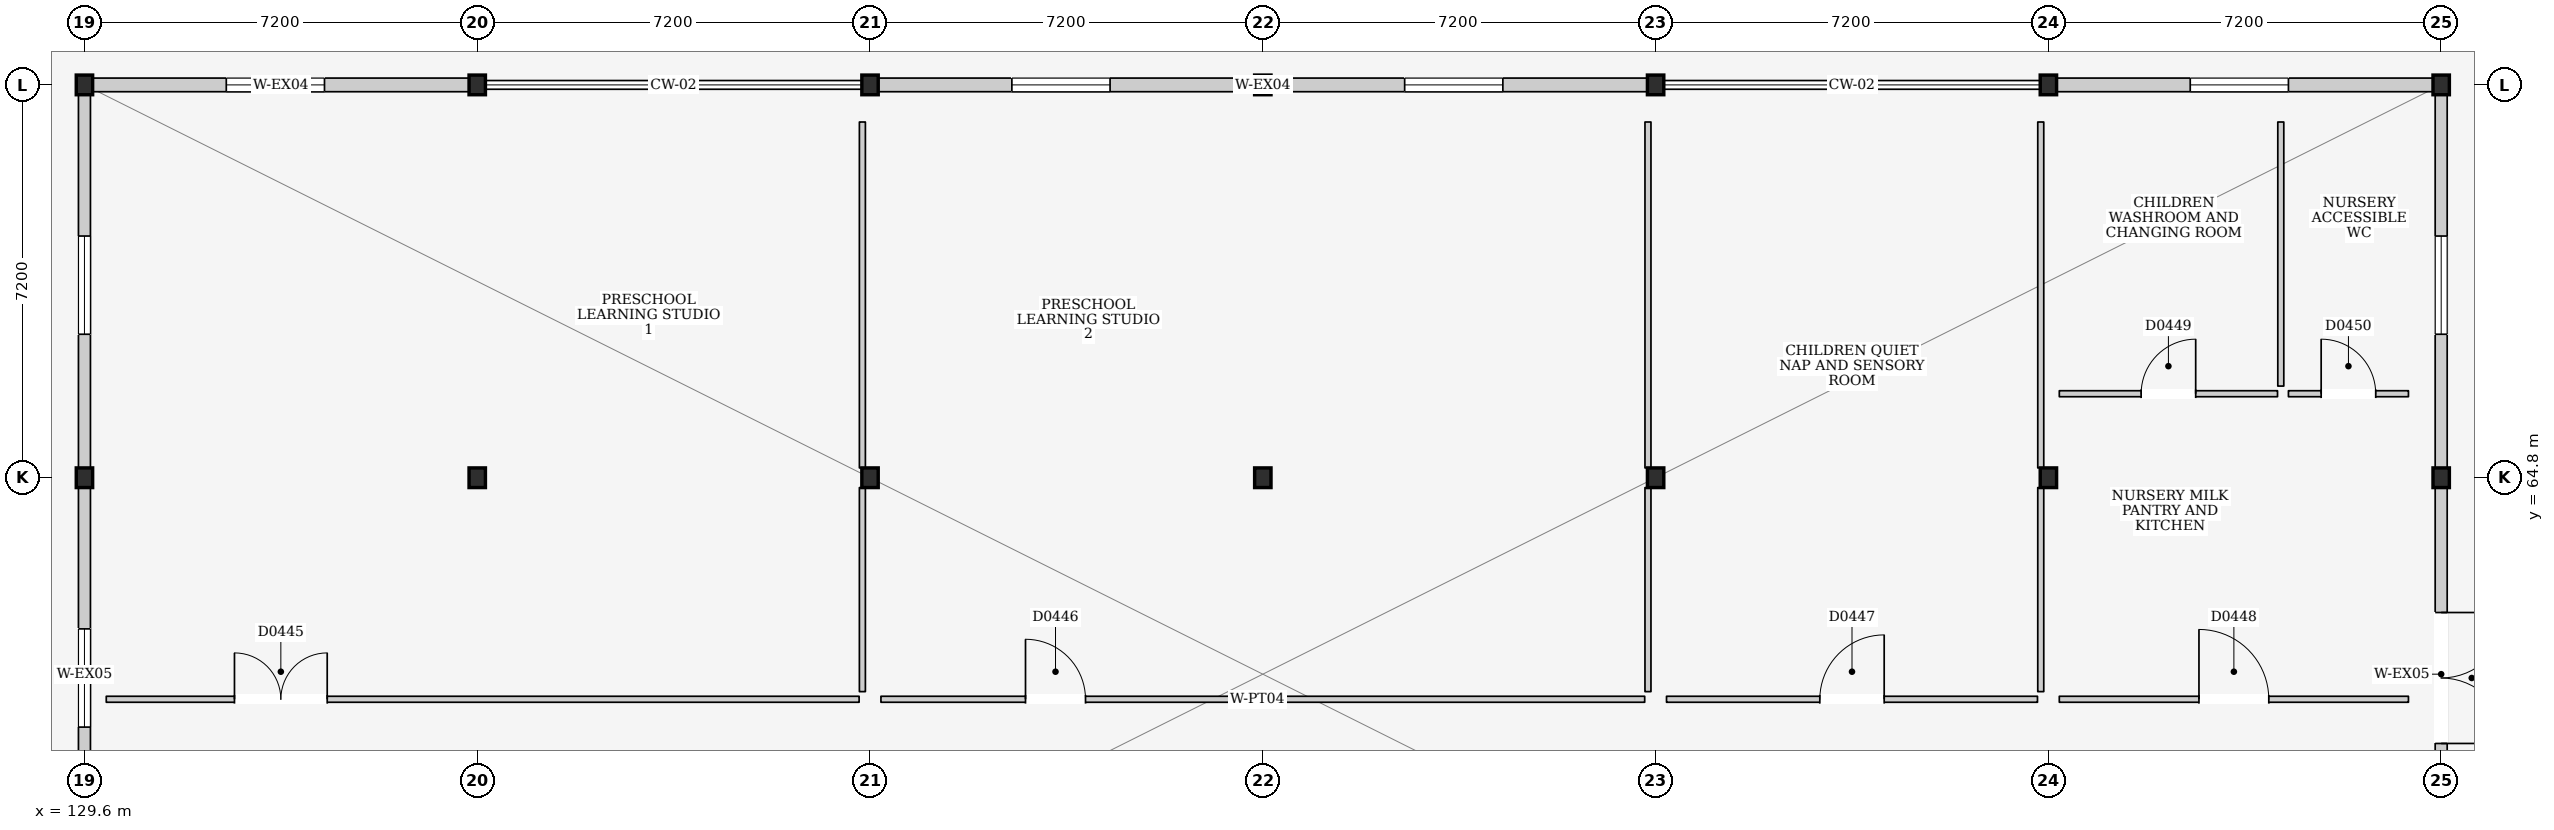
"""IFC4 building model, lengths in metres.
Left out: names, types, materials, properties, quantities, classifications, styles, units other than length and angle.
Written with IfcOpenShell. Run it as: python <this file> out.ifc"""

import sys

from ifc_helpers import new_model, si_unit, direction, frame, frame_2d, origin, origin_2d, place, context, subcontext, project, spatial, rectangle, i_section, extrude, element, fill, save


model = new_model("IFC4")
c1 = context("Model", 3, precision=1e-05, world=origin(), true_north=direction((0.0, 1.0)))
c2 = subcontext(c1, "Body", "Model", "MODEL_VIEW")
j1 = project(units=[si_unit("LENGTHUNIT", "METRE"), si_unit("PLANEANGLEUNIT", "RADIAN")], contexts=[c1])
p1 = place(None, origin())
s1 = spatial("IfcSite", under=j1, at=p1, CompositionType="ELEMENT")
p2 = place(p1, origin())
s2 = spatial("IfcBuilding", under=s1, at=p2, CompositionType="ELEMENT")
p3 = place(p2, origin())
s3 = spatial("IfcBuildingStorey", under=s2, at=p3, CompositionType="ELEMENT", Elevation=0.0)
for number, where, z_axis, x_axis in (
    (1, (129.6, 64.8, 0.0), (0.0, 0.0, 1.0), (1.0, 0.0, 0.0)),
    (2, (129.6, 72.0, 0.0), (0.0, 0.0, 1.0), (1.0, 0.0, 0.0)),
    (3, (136.8, 64.8, 0.0), (0.0, 0.0, 1.0), (1.0, 0.0, 0.0)),
    (4, (136.8, 72.0, 0.0), (0.0, 0.0, 1.0), (1.0, 0.0, 0.0)),
    (5, (144.0, 64.8, 0.0), (0.0, 0.0, 1.0), (1.0, 0.0, 0.0)),
    (6, (144.0, 72.0, 0.0), (0.0, 0.0, 1.0), (1.0, 0.0, 0.0)),
    (7, (151.2, 64.8, 0.0), (0.0, 0.0, 1.0), (1.0, 0.0, 0.0)),
    (8, (151.2, 72.0, 0.0), (0.0, 0.0, 1.0), (1.0, 0.0, 0.0)),
    (9, (158.4, 64.8, 0.0), (0.0, 0.0, 1.0), (1.0, 0.0, 0.0)),
    (10, (158.4, 72.0, 0.0), (0.0, 0.0, 1.0), (1.0, 0.0, 0.0)),
    (11, (165.6, 64.8, 0.0), (0.0, 0.0, 1.0), (1.0, 0.0, 0.0)),
    (12, (165.6, 72.0, 0.0), (0.0, 0.0, 1.0), (1.0, 0.0, 0.0)),
    (13, (172.8, 64.8, 0.0), (0.0, 0.0, 1.0), (1.0, 0.0, 0.0)),
    (14, (172.8, 72.0, 0.0), (0.0, 0.0, 1.0), (1.0, 0.0, 0.0)),
):
    element("IfcColumn", number, at=place(p3, frame(where, z_axis=z_axis, x_axis=x_axis)), inside=s3, PredefinedType="COLUMN", context=c2, shape_type="SweptSolid", body=[
        extrude(i_section(OverallWidth=0.3, OverallDepth=0.36, WebThickness=0.012, FlangeThickness=0.022, at=origin_2d()), origin(), (0.0, 0.0, 1.0), 4.5),
    ])
p4 = place(p3, frame((129.75, 72.0, 0.0), z_axis=(0.0, 0.0, 1.0), x_axis=(1.0, 0.0, 0.0)))
e15 = element("IfcWall", 15, at=p4, inside=s3, PredefinedType="SOLIDWALL", context=c2, shape_type="SweptSolid", body=[
    extrude(rectangle(XDim=6.9, YDim=0.25, at=frame_2d((3.45, 0.0))), origin(), (0.0, 0.0, 1.0), 3.55),
])
p5 = place(p4, frame((2.45, 0.0, 0.85)))
e16 = element("IfcOpeningElement", 16, at=p5, cuts=e15, PredefinedType="OPENING", context=c2, shape_type="SweptSolid", body=[
    extrude(rectangle(XDim=1.8, YDim=1.8, at=frame_2d((0.9, 0.9))), frame((0.0, 0.14, 0.0), z_axis=(0.0, -1.0, 0.0), x_axis=(1.0, 0.0, 0.0)), (0.0, 0.0, 1.0), 0.28),
])
p6 = place(p3, frame((144.15, 72.0, 0.0), z_axis=(0.0, 0.0, 1.0), x_axis=(1.0, 0.0, 0.0)))
e17 = element("IfcWall", 17, at=p6, inside=s3, PredefinedType="SOLIDWALL", context=c2, shape_type="SweptSolid", body=[
    extrude(rectangle(XDim=6.9, YDim=0.25, at=frame_2d((3.45, 0.0))), origin(), (0.0, 0.0, 1.0), 3.55),
])
p7 = place(p6, frame((2.45, 0.0, 0.85)))
e18 = element("IfcOpeningElement", 18, at=p7, cuts=e17, PredefinedType="OPENING", context=c2, shape_type="SweptSolid", body=[
    extrude(rectangle(XDim=1.8, YDim=1.8, at=frame_2d((0.9, 0.9))), frame((0.0, 0.14, 0.0), z_axis=(0.0, -1.0, 0.0), x_axis=(1.0, 0.0, 0.0)), (0.0, 0.0, 1.0), 0.28),
])
p8 = place(p3, frame((151.35, 72.0, 0.0), z_axis=(0.0, 0.0, 1.0), x_axis=(1.0, 0.0, 0.0)))
e19 = element("IfcWall", 19, at=p8, inside=s3, PredefinedType="SOLIDWALL", context=c2, shape_type="SweptSolid", body=[
    extrude(rectangle(XDim=6.9, YDim=0.25, at=frame_2d((3.45, 0.0))), origin(), (0.0, 0.0, 1.0), 3.55),
])
p9 = place(p8, frame((2.45, 0.0, 0.85)))
e20 = element("IfcOpeningElement", 20, at=p9, cuts=e19, PredefinedType="OPENING", context=c2, shape_type="SweptSolid", body=[
    extrude(rectangle(XDim=1.8, YDim=1.8, at=frame_2d((0.9, 0.9))), frame((0.0, 0.14, 0.0), z_axis=(0.0, -1.0, 0.0), x_axis=(1.0, 0.0, 0.0)), (0.0, 0.0, 1.0), 0.28),
])
p10 = place(p3, frame((165.75, 72.0, 0.0), z_axis=(0.0, 0.0, 1.0), x_axis=(1.0, 0.0, 0.0)))
e21 = element("IfcWall", 21, at=p10, inside=s3, PredefinedType="SOLIDWALL", context=c2, shape_type="SweptSolid", body=[
    extrude(rectangle(XDim=6.9, YDim=0.25, at=frame_2d((3.45, 0.0))), origin(), (0.0, 0.0, 1.0), 3.55),
])
p11 = place(p10, frame((2.45, 0.0, 0.85)))
e22 = element("IfcOpeningElement", 22, at=p11, cuts=e21, PredefinedType="OPENING", context=c2, shape_type="SweptSolid", body=[
    extrude(rectangle(XDim=1.8, YDim=1.8, at=frame_2d((0.9, 0.9))), frame((0.0, 0.14, 0.0), z_axis=(0.0, -1.0, 0.0), x_axis=(1.0, 0.0, 0.0)), (0.0, 0.0, 1.0), 0.28),
])
p12 = place(p3, frame((129.6, 57.78, 0.0), z_axis=(0.0, 0.0, 1.0), x_axis=(0.0, 1.0, 0.0)))
e23 = element("IfcWall", 23, at=p12, inside=s3, PredefinedType="ELEMENTEDWALL", context=c2, shape_type="SweptSolid", body=[
    extrude(rectangle(XDim=6.84, YDim=0.22, at=frame_2d((3.42, 0.0))), origin(), (0.0, 0.0, 1.0), 3.585),
])
p13 = place(p12, frame((2.45, 0.0, 0.9)))
e24 = element("IfcOpeningElement", 24, at=p13, cuts=e23, PredefinedType="OPENING", context=c2, shape_type="SweptSolid", body=[
    extrude(rectangle(XDim=1.8, YDim=1.8, at=frame_2d((0.9, 0.9))), frame((0.0, 0.125, 0.0), z_axis=(0.0, -1.0, 0.0), x_axis=(1.0, 0.0, 0.0)), (0.0, 0.0, 1.0), 0.25),
])
p14 = place(p3, frame((172.8, 57.78, 0.0), z_axis=(0.0, 0.0, 1.0), x_axis=(0.0, 1.0, 0.0)))
e25 = element("IfcWall", 25, at=p14, inside=s3, PredefinedType="ELEMENTEDWALL", context=c2, shape_type="SweptSolid", body=[
    extrude(rectangle(XDim=6.84, YDim=0.22, at=frame_2d((3.42, 0.0))), origin(), (0.0, 0.0, 1.0), 3.585),
])
p15 = place(p14, frame((2.15, 0.0, 0.0)))
e26 = element("IfcOpeningElement", 26, at=p15, cuts=e25, PredefinedType="OPENING", context=c2, shape_type="SweptSolid", body=[
    extrude(rectangle(XDim=2.4, YDim=2.4, at=frame_2d((1.2, 1.2))), frame((0.0, 0.125, 0.0), z_axis=(0.0, -1.0, 0.0), x_axis=(1.0, 0.0, 0.0)), (0.0, 0.0, 1.0), 0.25),
])
p16 = place(p3, frame((129.6, 64.98, 0.0), z_axis=(0.0, 0.0, 1.0), x_axis=(0.0, 1.0, 0.0)))
e27 = element("IfcWall", 27, at=p16, inside=s3, PredefinedType="ELEMENTEDWALL", context=c2, shape_type="SweptSolid", body=[
    extrude(rectangle(XDim=6.84, YDim=0.22, at=frame_2d((3.42, 0.0))), origin(), (0.0, 0.0, 1.0), 3.585),
])
p17 = place(p16, frame((2.45, 0.0, 0.9)))
e28 = element("IfcOpeningElement", 28, at=p17, cuts=e27, PredefinedType="OPENING", context=c2, shape_type="SweptSolid", body=[
    extrude(rectangle(XDim=1.8, YDim=1.8, at=frame_2d((0.9, 0.9))), frame((0.0, 0.125, 0.0), z_axis=(0.0, -1.0, 0.0), x_axis=(1.0, 0.0, 0.0)), (0.0, 0.0, 1.0), 0.25),
])
p18 = place(p3, frame((172.8, 64.98, 0.0), z_axis=(0.0, 0.0, 1.0), x_axis=(0.0, 1.0, 0.0)))
e29 = element("IfcWall", 29, at=p18, inside=s3, PredefinedType="ELEMENTEDWALL", context=c2, shape_type="SweptSolid", body=[
    extrude(rectangle(XDim=6.84, YDim=0.22, at=frame_2d((3.42, 0.0))), origin(), (0.0, 0.0, 1.0), 3.585),
])
p19 = place(p18, frame((2.45, 0.0, 0.9)))
e30 = element("IfcOpeningElement", 30, at=p19, cuts=e29, PredefinedType="OPENING", context=c2, shape_type="SweptSolid", body=[
    extrude(rectangle(XDim=1.8, YDim=1.8, at=frame_2d((0.9, 0.9))), frame((0.0, 0.125, 0.0), z_axis=(0.0, -1.0, 0.0), x_axis=(1.0, 0.0, 0.0)), (0.0, 0.0, 1.0), 0.25),
])
p20 = place(p3, frame((130.0, 60.74, 0.0), z_axis=(0.0, 0.0, 1.0), x_axis=(1.0, 0.0, 0.0)))
e31 = element("IfcWall", 31, at=p20, inside=s3, PredefinedType="PARTITIONING", context=c2, shape_type="SweptSolid", body=[
    extrude(rectangle(XDim=13.8, YDim=0.11, at=frame_2d((6.9, 0.0))), origin(), (0.0, 0.0, 1.0), 4.2),
])
p21 = place(p20, frame((2.35, 0.0, 0.0)))
e32 = element("IfcOpeningElement", 32, at=p21, cuts=e31, PredefinedType="OPENING", context=c2, shape_type="SweptSolid", body=[
    extrude(rectangle(XDim=1.7, YDim=2.35, at=frame_2d((0.85, 1.175))), frame((0.0, 0.07, 0.0), z_axis=(0.0, -1.0, 0.0), x_axis=(1.0, 0.0, 0.0)), (0.0, 0.0, 1.0), 0.14),
])
p22 = place(p3, frame((143.86, 60.88, 0.0), z_axis=(0.0, 0.0, 1.0), x_axis=(0.0, 1.0, 0.0)))
e33 = element("IfcWall", 33, at=p22, inside=s3, PredefinedType="PARTITIONING", context=c2, shape_type="SweptSolid", body=[
    extrude(rectangle(XDim=3.74, YDim=0.11, at=frame_2d((1.87, 0.0))), origin(), (0.0, 0.0, 1.0), 3.585),
])
p23 = place(p3, frame((143.86, 64.98, 0.0), z_axis=(0.0, 0.0, 1.0), x_axis=(0.0, 1.0, 0.0)))
e34 = element("IfcWall", 34, at=p23, inside=s3, PredefinedType="PARTITIONING", context=c2, shape_type="SweptSolid", body=[
    extrude(rectangle(XDim=6.34, YDim=0.11, at=frame_2d((3.17, 0.0))), origin(), (0.0, 0.0, 1.0), 3.585),
])
p24 = place(p3, frame((144.2, 60.74, 0.0), z_axis=(0.0, 0.0, 1.0), x_axis=(1.0, 0.0, 0.0)))
e35 = element("IfcWall", 35, at=p24, inside=s3, PredefinedType="PARTITIONING", context=c2, shape_type="SweptSolid", body=[
    extrude(rectangle(XDim=14.0, YDim=0.11, at=frame_2d((7.0, 0.0))), origin(), (0.0, 0.0, 1.0), 4.2),
])
p25 = place(p24, frame((2.65, 0.0, 0.0)))
e36 = element("IfcOpeningElement", 36, at=p25, cuts=e35, PredefinedType="OPENING", context=c2, shape_type="SweptSolid", body=[
    extrude(rectangle(XDim=1.1, YDim=2.25, at=frame_2d((0.55, 1.125))), frame((0.0, 0.07, 0.0), z_axis=(0.0, -1.0, 0.0), x_axis=(1.0, 0.0, 0.0)), (0.0, 0.0, 1.0), 0.14),
])
p26 = place(p3, frame((158.26, 60.88, 0.0), z_axis=(0.0, 0.0, 1.0), x_axis=(0.0, 1.0, 0.0)))
e37 = element("IfcWall", 37, at=p26, inside=s3, PredefinedType="PARTITIONING", context=c2, shape_type="SweptSolid", body=[
    extrude(rectangle(XDim=3.74, YDim=0.11, at=frame_2d((1.87, 0.0))), origin(), (0.0, 0.0, 1.0), 3.585),
])
p27 = place(p3, frame((158.26, 64.98, 0.0), z_axis=(0.0, 0.0, 1.0), x_axis=(0.0, 1.0, 0.0)))
e38 = element("IfcWall", 38, at=p27, inside=s3, PredefinedType="PARTITIONING", context=c2, shape_type="SweptSolid", body=[
    extrude(rectangle(XDim=6.34, YDim=0.11, at=frame_2d((3.17, 0.0))), origin(), (0.0, 0.0, 1.0), 3.585),
])
p28 = place(p3, frame((158.6, 60.74, 0.0), z_axis=(0.0, 0.0, 1.0), x_axis=(1.0, 0.0, 0.0)))
e39 = element("IfcWall", 39, at=p28, inside=s3, PredefinedType="PARTITIONING", context=c2, shape_type="SweptSolid", body=[
    extrude(rectangle(XDim=6.8, YDim=0.11, at=frame_2d((3.4, 0.0))), origin(), (0.0, 0.0, 1.0), 4.2),
])
p29 = place(p28, frame((2.81, 0.0, 0.0)))
e40 = element("IfcOpeningElement", 40, at=p29, cuts=e39, PredefinedType="OPENING", context=c2, shape_type="SweptSolid", body=[
    extrude(rectangle(XDim=1.18, YDim=2.25, at=frame_2d((0.59, 1.125))), frame((0.0, 0.07, 0.0), z_axis=(0.0, -1.0, 0.0), x_axis=(1.0, 0.0, 0.0)), (0.0, 0.0, 1.0), 0.14),
])
p30 = place(p3, frame((165.46, 60.88, 0.0), z_axis=(0.0, 0.0, 1.0), x_axis=(0.0, 1.0, 0.0)))
e41 = element("IfcWall", 41, at=p30, inside=s3, PredefinedType="PARTITIONING", context=c2, shape_type="SweptSolid", body=[
    extrude(rectangle(XDim=3.74, YDim=0.11, at=frame_2d((1.87, 0.0))), origin(), (0.0, 0.0, 1.0), 3.585),
])
p31 = place(p3, frame((165.46, 64.98, 0.0), z_axis=(0.0, 0.0, 1.0), x_axis=(0.0, 1.0, 0.0)))
e42 = element("IfcWall", 42, at=p31, inside=s3, PredefinedType="PARTITIONING", context=c2, shape_type="SweptSolid", body=[
    extrude(rectangle(XDim=6.34, YDim=0.11, at=frame_2d((3.17, 0.0))), origin(), (0.0, 0.0, 1.0), 3.585),
])
p32 = place(p3, frame((165.8, 60.74, 0.0), z_axis=(0.0, 0.0, 1.0), x_axis=(1.0, 0.0, 0.0)))
e43 = element("IfcWall", 43, at=p32, inside=s3, PredefinedType="PARTITIONING", context=c2, shape_type="SweptSolid", body=[
    extrude(rectangle(XDim=6.4, YDim=0.11, at=frame_2d((3.2, 0.0))), origin(), (0.0, 0.0, 1.0), 4.2),
])
p33 = place(p32, frame((2.56, 0.0, 0.0)))
e44 = element("IfcOpeningElement", 44, at=p33, cuts=e43, PredefinedType="OPENING", context=c2, shape_type="SweptSolid", body=[
    extrude(rectangle(XDim=1.28, YDim=2.28, at=frame_2d((0.64, 1.14))), frame((0.0, 0.07, 0.0), z_axis=(0.0, -1.0, 0.0), x_axis=(1.0, 0.0, 0.0)), (0.0, 0.0, 1.0), 0.14),
])
p34 = place(p3, frame((165.8, 66.34, 0.0), z_axis=(0.0, 0.0, 1.0), x_axis=(1.0, 0.0, 0.0)))
e45 = element("IfcWall", 45, at=p34, inside=s3, PredefinedType="PARTITIONING", context=c2, shape_type="SweptSolid", body=[
    extrude(rectangle(XDim=4.0, YDim=0.11, at=frame_2d((2.0, 0.0))), origin(), (0.0, 0.0, 1.0), 4.2),
])
p35 = place(p34, frame((1.5, 0.0, 0.0)))
e46 = element("IfcOpeningElement", 46, at=p35, cuts=e45, PredefinedType="OPENING", context=c2, shape_type="SweptSolid", body=[
    extrude(rectangle(XDim=1.0, YDim=2.1, at=frame_2d((0.5, 1.05))), frame((0.0, 0.07, 0.0), z_axis=(0.0, -1.0, 0.0), x_axis=(1.0, 0.0, 0.0)), (0.0, 0.0, 1.0), 0.14),
])
p36 = place(p3, frame((169.86, 66.48, 0.0), z_axis=(0.0, 0.0, 1.0), x_axis=(0.0, 1.0, 0.0)))
e47 = element("IfcWall", 47, at=p36, inside=s3, PredefinedType="PARTITIONING", context=c2, shape_type="SweptSolid", body=[
    extrude(rectangle(XDim=4.84, YDim=0.11, at=frame_2d((2.42, 0.0))), origin(), (0.0, 0.0, 1.0), 4.2),
])
p37 = place(p3, frame((170.0, 66.34, 0.0), z_axis=(0.0, 0.0, 1.0), x_axis=(1.0, 0.0, 0.0)))
e48 = element("IfcWall", 48, at=p37, inside=s3, PredefinedType="PARTITIONING", context=c2, shape_type="SweptSolid", body=[
    extrude(rectangle(XDim=2.2, YDim=0.11, at=frame_2d((1.1, 0.0))), origin(), (0.0, 0.0, 1.0), 4.2),
])
p38 = place(p37, frame((0.6, 0.0, 0.0)))
e49 = element("IfcOpeningElement", 49, at=p38, cuts=e48, PredefinedType="OPENING", context=c2, shape_type="SweptSolid", body=[
    extrude(rectangle(XDim=1.0, YDim=2.1, at=frame_2d((0.5, 1.05))), frame((0.0, 0.07, 0.0), z_axis=(0.0, -1.0, 0.0), x_axis=(1.0, 0.0, 0.0)), (0.0, 0.0, 1.0), 0.14),
])
p39 = place(p5, origin())
e50 = element("IfcWindow", 50, at=p39, inside=s3, PartitioningType="DOUBLE_PANEL_VERTICAL", PredefinedType="WINDOW", context=c2, shape_type="SweptSolid", body=[
    extrude(rectangle(XDim=1.8, YDim=1.8, at=frame_2d((0.9, 0.9))), frame((0.0, 0.03, 0.0), z_axis=(0.0, -1.0, 0.0), x_axis=(1.0, 0.0, 0.0)), (0.0, 0.0, 1.0), 0.06),
])
fill(e16, e50)
p40 = place(p7, origin())
e51 = element("IfcWindow", 51, at=p40, inside=s3, PartitioningType="DOUBLE_PANEL_VERTICAL", PredefinedType="WINDOW", context=c2, shape_type="SweptSolid", body=[
    extrude(rectangle(XDim=1.8, YDim=1.8, at=frame_2d((0.9, 0.9))), frame((0.0, 0.03, 0.0), z_axis=(0.0, -1.0, 0.0), x_axis=(1.0, 0.0, 0.0)), (0.0, 0.0, 1.0), 0.06),
])
fill(e18, e51)
p41 = place(p9, origin())
e52 = element("IfcWindow", 52, at=p41, inside=s3, PartitioningType="DOUBLE_PANEL_VERTICAL", PredefinedType="WINDOW", context=c2, shape_type="SweptSolid", body=[
    extrude(rectangle(XDim=1.8, YDim=1.8, at=frame_2d((0.9, 0.9))), frame((0.0, 0.03, 0.0), z_axis=(0.0, -1.0, 0.0), x_axis=(1.0, 0.0, 0.0)), (0.0, 0.0, 1.0), 0.06),
])
fill(e20, e52)
p42 = place(p11, origin())
e53 = element("IfcWindow", 53, at=p42, inside=s3, PartitioningType="DOUBLE_PANEL_VERTICAL", PredefinedType="WINDOW", context=c2, shape_type="SweptSolid", body=[
    extrude(rectangle(XDim=1.8, YDim=1.8, at=frame_2d((0.9, 0.9))), frame((0.0, 0.03, 0.0), z_axis=(0.0, -1.0, 0.0), x_axis=(1.0, 0.0, 0.0)), (0.0, 0.0, 1.0), 0.06),
])
fill(e22, e53)
p43 = place(p13, origin())
e54 = element("IfcWindow", 54, at=p43, inside=s3, PartitioningType="DOUBLE_PANEL_VERTICAL", PredefinedType="WINDOW", context=c2, shape_type="SweptSolid", body=[
    extrude(rectangle(XDim=1.8, YDim=1.8, at=frame_2d((0.9, 0.9))), frame((0.0, 0.03, 0.0), z_axis=(0.0, -1.0, 0.0), x_axis=(1.0, 0.0, 0.0)), (0.0, 0.0, 1.0), 0.06),
])
fill(e24, e54)
p44 = place(p15, frame((2.4, 0.0, 0.0), z_axis=(0.0, 0.0, 1.0), x_axis=(-1.0, 0.0, 0.0)))
e55 = element("IfcDoor", 55, at=p44, inside=s3, OperationType="DOUBLE_DOOR_SINGLE_SWING", PredefinedType="GATE", context=c2, shape_type="SweptSolid", body=[
    extrude(rectangle(XDim=2.4, YDim=2.4, at=frame_2d((1.2, 1.2))), frame((0.0, 0.025, 0.0), z_axis=(0.0, -1.0, 0.0), x_axis=(1.0, 0.0, 0.0)), (0.0, 0.0, 1.0), 0.05),
])
fill(e26, e55)
p45 = place(p17, origin())
e56 = element("IfcWindow", 56, at=p45, inside=s3, PartitioningType="DOUBLE_PANEL_VERTICAL", PredefinedType="WINDOW", context=c2, shape_type="SweptSolid", body=[
    extrude(rectangle(XDim=1.8, YDim=1.8, at=frame_2d((0.9, 0.9))), frame((0.0, 0.03, 0.0), z_axis=(0.0, -1.0, 0.0), x_axis=(1.0, 0.0, 0.0)), (0.0, 0.0, 1.0), 0.06),
])
fill(e28, e56)
p46 = place(p19, origin())
e57 = element("IfcWindow", 57, at=p46, inside=s3, PartitioningType="DOUBLE_PANEL_VERTICAL", PredefinedType="WINDOW", context=c2, shape_type="SweptSolid", body=[
    extrude(rectangle(XDim=1.8, YDim=1.8, at=frame_2d((0.9, 0.9))), frame((0.0, 0.03, 0.0), z_axis=(0.0, -1.0, 0.0), x_axis=(1.0, 0.0, 0.0)), (0.0, 0.0, 1.0), 0.06),
])
fill(e30, e57)
p47 = place(p21, origin())
e58 = element("IfcDoor", 58, at=p47, inside=s3, OperationType="DOUBLE_DOOR_SINGLE_SWING", PredefinedType="DOOR", context=c2, shape_type="SweptSolid", body=[
    extrude(rectangle(XDim=1.7, YDim=2.35, at=frame_2d((0.85, 1.175))), frame((0.0, 0.025, 0.0), z_axis=(0.0, -1.0, 0.0), x_axis=(1.0, 0.0, 0.0)), (0.0, 0.0, 1.0), 0.05),
])
fill(e32, e58)
p48 = place(p25, origin())
e59 = element("IfcDoor", 59, at=p48, inside=s3, OperationType="SINGLE_SWING_LEFT", PredefinedType="DOOR", context=c2, shape_type="SweptSolid", body=[
    extrude(rectangle(XDim=1.1, YDim=2.25, at=frame_2d((0.55, 1.125))), frame((0.0, 0.025, 0.0), z_axis=(0.0, -1.0, 0.0), x_axis=(1.0, 0.0, 0.0)), (0.0, 0.0, 1.0), 0.05),
])
fill(e36, e59)
p49 = place(p29, origin())
e60 = element("IfcDoor", 60, at=p49, inside=s3, OperationType="SINGLE_SWING_RIGHT", PredefinedType="DOOR", context=c2, shape_type="SweptSolid", body=[
    extrude(rectangle(XDim=1.18, YDim=2.25, at=frame_2d((0.59, 1.125))), frame((0.0, 0.025, 0.0), z_axis=(0.0, -1.0, 0.0), x_axis=(1.0, 0.0, 0.0)), (0.0, 0.0, 1.0), 0.05),
])
fill(e40, e60)
p50 = place(p33, origin())
e61 = element("IfcDoor", 61, at=p50, inside=s3, OperationType="SINGLE_SWING_LEFT", PredefinedType="DOOR", context=c2, shape_type="SweptSolid", body=[
    extrude(rectangle(XDim=1.28, YDim=2.28, at=frame_2d((0.64, 1.14))), frame((0.0, 0.025, 0.0), z_axis=(0.0, -1.0, 0.0), x_axis=(1.0, 0.0, 0.0)), (0.0, 0.0, 1.0), 0.05),
])
fill(e44, e61)
p51 = place(p35, origin())
e62 = element("IfcDoor", 62, at=p51, inside=s3, OperationType="SINGLE_SWING_RIGHT", PredefinedType="DOOR", context=c2, shape_type="SweptSolid", body=[
    extrude(rectangle(XDim=1.0, YDim=2.1, at=frame_2d((0.5, 1.05))), frame((0.0, 0.025, 0.0), z_axis=(0.0, -1.0, 0.0), x_axis=(1.0, 0.0, 0.0)), (0.0, 0.0, 1.0), 0.05),
])
fill(e46, e62)
p52 = place(p38, origin())
e63 = element("IfcDoor", 63, at=p52, inside=s3, OperationType="SINGLE_SWING_LEFT", PredefinedType="DOOR", context=c2, shape_type="SweptSolid", body=[
    extrude(rectangle(XDim=1.0, YDim=2.1, at=frame_2d((0.5, 1.05))), frame((0.0, 0.025, 0.0), z_axis=(0.0, -1.0, 0.0), x_axis=(1.0, 0.0, 0.0)), (0.0, 0.0, 1.0), 0.05),
])
fill(e49, e63)
save(model, sys.argv[1])
